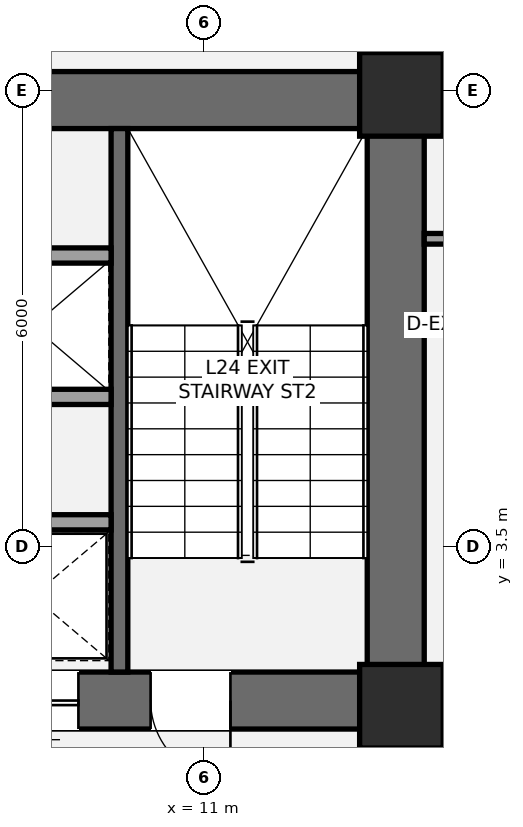
"""IFC4 building model, lengths in metres.
Left out: names, types, materials, properties, quantities, classifications, styles, units other than length and angle.
Written with IfcOpenShell. Run it as: python <this file> out.ifc"""

import sys

from ifc_helpers import new_model, si_unit, direction, frame, frame_2d, origin, origin_2d, place, context, subcontext, project, spatial, rectangle, extrude, element, fill, save


model = new_model("IFC4")
c1 = context("Model", 3, precision=1e-05, world=origin(), true_north=direction((0.0, 1.0)))
c2 = subcontext(c1, "Body", "Model", "MODEL_VIEW")
j1 = project(units=[si_unit("LENGTHUNIT", "METRE"), si_unit("PLANEANGLEUNIT", "RADIAN")], contexts=[c1])
p1 = place(None, origin())
s1 = spatial("IfcSite", under=j1, at=p1, CompositionType="ELEMENT")
p2 = place(p1, origin())
s2 = spatial("IfcBuilding", under=s1, at=p2, CompositionType="ELEMENT")
p3 = place(p2, frame((0.0, 0.0, 93.1)))
s3 = spatial("IfcBuildingStorey", under=s2, at=p3, CompositionType="ELEMENT", Elevation=93.1)
p4 = place(p3, frame((13.525, 1.1, 0.0), z_axis=(0.0, 0.0, 1.0), x_axis=(0.0, 1.0, 0.0)))
e1 = element("IfcWall", 1, at=p4, inside=s3, PredefinedType="SHEAR", context=c2, shape_type="SweptSolid", body=[
    extrude(rectangle(XDim=8.65, YDim=0.75, at=frame_2d((4.325, 0.0))), origin(), (0.0, 0.0, 1.0), 3.5),
])
p5 = place(p3, frame((4.425, 9.375, 0.0), z_axis=(0.0, 0.0, 1.0), x_axis=(1.0, 0.0, 0.0)))
e2 = element("IfcWall", 2, at=p5, inside=s3, PredefinedType="SHEAR", context=c2, shape_type="SweptSolid", body=[
    extrude(rectangle(XDim=9.475, YDim=0.75, at=frame_2d((4.737, 0.0))), origin(), (0.0, 0.0, 1.0), 3.5),
])
p6 = place(p3, frame((13.9, 1.475, 0.0), z_axis=(0.0, 0.0, 1.0), x_axis=(-1.0, 0.0, 0.0)))
e3 = element("IfcWall", 3, at=p6, inside=s3, PredefinedType="SHEAR", context=c2, shape_type="SweptSolid", body=[
    extrude(rectangle(XDim=9.075, YDim=0.75, at=frame_2d((4.538, 0.0))), origin(), (0.0, 0.0, 1.0), 3.5),
])
p7 = place(p6, frame((2.55, 0.0, 0.0)))
e4 = element("IfcOpeningElement", 4, at=p7, cuts=e3, PredefinedType="OPENING", context=c2, shape_type="SweptSolid", body=[
    extrude(rectangle(XDim=1.05, YDim=2.15, at=frame_2d((0.525, 1.075))), frame((0.0, 0.385, 0.0), z_axis=(0.0, -1.0, 0.0), x_axis=(1.0, 0.0, 0.0)), (0.0, 0.0, 1.0), 0.77),
])
p8 = place(p6, frame((4.55, 0.0, 0.0)))
e5 = element("IfcOpeningElement", 5, at=p8, cuts=e3, PredefinedType="OPENING", context=c2, shape_type="SweptSolid", body=[
    extrude(rectangle(XDim=1.1, YDim=2.2, at=frame_2d((0.55, 1.1))), frame((0.0, 0.385, 0.0), z_axis=(0.0, -1.0, 0.0), x_axis=(1.0, 0.0, 0.0)), (0.0, 0.0, 1.0), 0.77),
])
p9 = place(p3, frame((9.89, 1.85, 0.0), z_axis=(0.0, 0.0, 1.0), x_axis=(0.0, 1.0, 0.0)))
e6 = element("IfcWall", 6, at=p9, inside=s3, PredefinedType="SHEAR", context=c2, shape_type="SweptSolid", body=[
    extrude(rectangle(XDim=7.15, YDim=0.22, at=frame_2d((3.575, 0.0))), origin(), (0.0, 0.0, 1.0), 3.5),
])
for number, where, z_axis, x_axis in (
    (7, (13.6, 1.4, 0.0), (0.0, 0.0, 1.0), (1.0, 0.0, 0.0)),
    (8, (13.6, 9.45, 0.0), (0.0, 0.0, 1.0), (1.0, 0.0, 0.0)),
):
    element("IfcColumn", number, at=place(p3, frame(where, z_axis=z_axis, x_axis=x_axis)), inside=s3, PredefinedType="COLUMN", context=c2, shape_type="SweptSolid", body=[
        extrude(rectangle(XDim=1.1, YDim=1.1, at=origin_2d()), origin(), (0.0, 0.0, 1.0), 3.5),
    ])
p10 = place(p3, frame((13.45, -2.15, 0.0), z_axis=(0.0, 0.0, 1.0), x_axis=(0.0, 1.0, 0.0)))
e9 = element("IfcWall", 9, at=p10, inside=s3, PredefinedType="PARTITIONING", context=c2, shape_type="SweptSolid", body=[
    extrude(rectangle(XDim=3.3, YDim=0.165, at=frame_2d((1.65, 0.0))), origin(), (0.0, 0.0, 1.0), 2.763),
])
p11 = place(p10, frame((1.15, 0.0, 0.0)))
e10 = element("IfcOpeningElement", 10, at=p11, cuts=e9, PredefinedType="OPENING", context=c2, shape_type="SweptSolid", body=[
    extrude(rectangle(XDim=1.05, YDim=2.15, at=frame_2d((0.525, 1.075))), frame((0.0, 0.093, 0.0), z_axis=(0.0, -1.0, 0.0), x_axis=(1.0, 0.0, 0.0)), (0.0, 0.0, 1.0), 0.185),
])
p12 = place(p3, frame((5.575, 3.82, 0.0), z_axis=(0.0, 0.0, 1.0), x_axis=(1.0, 0.0, 0.0)))
e11 = element("IfcWall", 11, at=p12, inside=s3, PredefinedType="SOLIDWALL", context=c2, shape_type="SweptSolid", body=[
    extrude(rectangle(XDim=4.205, YDim=0.2, at=frame_2d((2.103, 0.0))), origin(), (0.0, 0.0, 1.0), 3.31),
])
p13 = place(p12, frame((0.65, 0.0, 0.0)))
e12 = element("IfcOpeningElement", 12, at=p13, cuts=e11, PredefinedType="OPENING", context=c2, shape_type="SweptSolid", body=[
    extrude(rectangle(XDim=1.2, YDim=2.2, at=frame_2d((0.6, 1.1))), frame((0.0, 0.11, 0.0), z_axis=(0.0, -1.0, 0.0), x_axis=(1.0, 0.0, 0.0)), (0.0, 0.0, 1.0), 0.22),
])
for number, where, z_axis, x_axis in (
    (13, (5.575, 5.47, 0.0), (0.0, 0.0, 1.0), (1.0, 0.0, 0.0)),
    (14, (5.575, 7.33, 0.0), (0.0, 0.0, 1.0), (1.0, 0.0, 0.0)),
):
    element("IfcWall", number, at=place(p3, frame(where, z_axis=z_axis, x_axis=x_axis)), inside=s3, PredefinedType="SOLIDWALL", context=c2, shape_type="SweptSolid", body=[
        extrude(rectangle(XDim=4.205, YDim=0.2, at=frame_2d((2.103, 0.0))), origin(), (0.0, 0.0, 1.0), 3.31),
    ])
p14 = place(p3, frame((13.9, 7.55, 0.0), z_axis=(0.0, 0.0, 1.0), x_axis=(1.0, 0.0, 0.0)))
e15 = element("IfcWall", 15, at=p14, inside=s3, PredefinedType="PARTITIONING", context=c2, shape_type="SweptSolid", body=[
    extrude(rectangle(XDim=3.6, YDim=0.14, at=frame_2d((1.8, 0.0))), origin(), (0.0, 0.0, 1.0), 2.763),
])
p15 = place(p14, frame((0.32, 0.0, 0.0)))
e16 = element("IfcOpeningElement", 16, at=p15, cuts=e15, PredefinedType="OPENING", context=c2, shape_type="SweptSolid", body=[
    extrude(rectangle(XDim=0.92, YDim=2.15, at=frame_2d((0.46, 1.075))), frame((0.0, 0.08, 0.0), z_axis=(0.0, -1.0, 0.0), x_axis=(1.0, 0.0, 0.0)), (0.0, 0.0, 1.0), 0.16),
])
p16 = place(p7, origin())
e17 = element("IfcDoor", 17, at=p16, inside=s3, OperationType="SINGLE_SWING_LEFT", PredefinedType="DOOR", context=c2, shape_type="SweptSolid", body=[
    extrude(rectangle(XDim=1.05, YDim=2.15, at=frame_2d((0.525, 1.075))), frame((0.0, 0.025, 0.0), z_axis=(0.0, -1.0, 0.0), x_axis=(1.0, 0.0, 0.0)), (0.0, 0.0, 1.0), 0.05),
])
fill(e4, e17)
p17 = place(p8, origin())
e18 = element("IfcDoor", 18, at=p17, inside=s3, OperationType="SLIDING_TO_LEFT", PredefinedType="DOOR", context=c2, shape_type="SweptSolid", body=[
    extrude(rectangle(XDim=1.1, YDim=2.2, at=frame_2d((0.55, 1.1))), frame((0.0, 0.025, 0.0), z_axis=(0.0, -1.0, 0.0), x_axis=(1.0, 0.0, 0.0)), (0.0, 0.0, 1.0), 0.05),
])
fill(e5, e18)
save(model, sys.argv[1])
